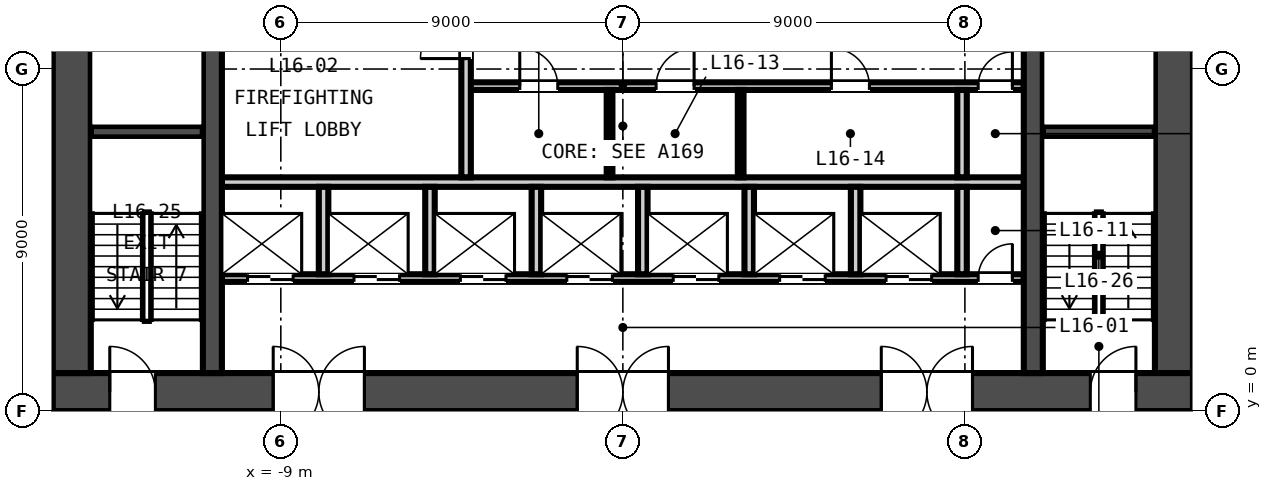
"""IFC4 building model, lengths in metres.
Left out: names, types, materials, properties, quantities, classifications, styles, units other than length and angle.
Written with IfcOpenShell. Run it as: python <this file> out.ifc"""

import sys

from ifc_helpers import new_model, si_unit, direction, frame, frame_2d, origin, place, context, subcontext, project, spatial, rectangle, extrude, element, fill, save


model = new_model("IFC4")
c1 = context("Model", 3, precision=1e-05, world=origin(), true_north=direction((0.0, 1.0)))
c2 = subcontext(c1, "Body", "Model", "MODEL_VIEW")
j1 = project(units=[si_unit("LENGTHUNIT", "METRE"), si_unit("PLANEANGLEUNIT", "RADIAN")], contexts=[c1])
p1 = place(None, origin())
s1 = spatial("IfcSite", under=j1, at=p1, CompositionType="ELEMENT")
p2 = place(p1, origin())
s2 = spatial("IfcBuilding", under=s1, at=p2, CompositionType="ELEMENT")
p3 = place(p2, frame((0.0, 0.0, 72.5)))
s3 = spatial("IfcBuildingStorey", under=s2, at=p3, CompositionType="ELEMENT", Elevation=72.5)
p4 = place(p3, frame((-15.0, 0.5, -0.15), z_axis=(0.0, 0.0, 1.0), x_axis=(1.0, 0.0, 0.0)))
e1 = element("IfcWall", 1, at=p4, inside=s3, PredefinedType="SOLIDWALL", context=c2, shape_type="SweptSolid", body=[
    extrude(rectangle(XDim=30.0, YDim=1.0, at=frame_2d((15.0, 0.0))), origin(), (0.0, 0.0, 1.0), 3.5),
])
p5 = place(p4, frame((5.8, 0.0, 0.15)))
e2 = element("IfcOpeningElement", 2, at=p5, cuts=e1, PredefinedType="OPENING", context=c2, shape_type="SweptSolid", body=[
    extrude(rectangle(XDim=2.4, YDim=2.4, at=frame_2d((1.2, 1.2))), frame((0.0, 0.51, 0.0), z_axis=(0.0, -1.0, 0.0), x_axis=(1.0, 0.0, 0.0)), (0.0, 0.0, 1.0), 1.02),
])
p6 = place(p4, frame((13.8, 0.0, 0.15)))
e3 = element("IfcOpeningElement", 3, at=p6, cuts=e1, PredefinedType="OPENING", context=c2, shape_type="SweptSolid", body=[
    extrude(rectangle(XDim=2.4, YDim=2.4, at=frame_2d((1.2, 1.2))), frame((0.0, 0.51, 0.0), z_axis=(0.0, -1.0, 0.0), x_axis=(1.0, 0.0, 0.0)), (0.0, 0.0, 1.0), 1.02),
])
p7 = place(p4, frame((21.8, 0.0, 0.15)))
e4 = element("IfcOpeningElement", 4, at=p7, cuts=e1, PredefinedType="OPENING", context=c2, shape_type="SweptSolid", body=[
    extrude(rectangle(XDim=2.4, YDim=2.4, at=frame_2d((1.2, 1.2))), frame((0.0, 0.51, 0.0), z_axis=(0.0, -1.0, 0.0), x_axis=(1.0, 0.0, 0.0)), (0.0, 0.0, 1.0), 1.02),
])
p8 = place(p4, frame((1.5, 0.0, 0.15)))
e5 = element("IfcOpeningElement", 5, at=p8, cuts=e1, PredefinedType="OPENING", context=c2, shape_type="SweptSolid", body=[
    extrude(rectangle(XDim=1.2, YDim=2.1, at=frame_2d((0.6, 1.05))), frame((0.0, 0.51, 0.0), z_axis=(0.0, -1.0, 0.0), x_axis=(1.0, 0.0, 0.0)), (0.0, 0.0, 1.0), 1.02),
])
p9 = place(p4, frame((27.3, 0.0, 0.15)))
e6 = element("IfcOpeningElement", 6, at=p9, cuts=e1, PredefinedType="OPENING", context=c2, shape_type="SweptSolid", body=[
    extrude(rectangle(XDim=1.2, YDim=2.1, at=frame_2d((0.6, 1.05))), frame((0.0, 0.51, 0.0), z_axis=(0.0, -1.0, 0.0), x_axis=(1.0, 0.0, 0.0)), (0.0, 0.0, 1.0), 1.02),
])
for number, where, z_axis, x_axis in (
    (7, (-14.5, 1.0, -0.15), (0.0, 0.0, 1.0), (0.0, 1.0, 0.0)),
    (8, (14.5, 1.0, -0.15), (0.0, 0.0, 1.0), (0.0, 1.0, 0.0)),
):
    element("IfcWall", number, at=place(p3, frame(where, z_axis=z_axis, x_axis=x_axis)), inside=s3, PredefinedType="SOLIDWALL", context=c2, shape_type="SweptSolid", body=[
        extrude(rectangle(XDim=13.0, YDim=1.0, at=frame_2d((6.5, 0.0))), origin(), (0.0, 0.0, 1.0), 3.5),
    ])
for number, where, z_axis, x_axis in (
    (9, (-10.8, 1.0, -0.15), (0.0, 0.0, 1.0), (0.0, 1.0, 0.0)),
    (10, (10.8, 1.0, -0.15), (0.0, 0.0, 1.0), (0.0, 1.0, 0.0)),
):
    element("IfcWall", number, at=place(p3, frame(where, z_axis=z_axis, x_axis=x_axis)), inside=s3, PredefinedType="SOLIDWALL", context=c2, shape_type="SweptSolid", body=[
        extrude(rectangle(XDim=13.0, YDim=0.5, at=frame_2d((6.5, 0.0))), origin(), (0.0, 0.0, 1.0), 3.5),
    ])
p10 = place(p3, frame((-10.55, 3.5, 0.0), z_axis=(0.0, 0.0, 1.0), x_axis=(1.0, 0.0, 0.0)))
e11 = element("IfcWall", 11, at=p10, inside=s3, PredefinedType="PARTITIONING", context=c2, shape_type="SweptSolid", body=[
    extrude(rectangle(XDim=21.1, YDim=0.2, at=frame_2d((10.55, 0.0))), origin(), (0.0, 0.0, 1.0), 3.35),
])
p11 = place(p10, frame((0.675, 0.0, 0.0)))
e12 = element("IfcOpeningElement", 12, at=p11, cuts=e11, PredefinedType="OPENING", context=c2, shape_type="SweptSolid", body=[
    extrude(rectangle(XDim=1.2, YDim=2.1, at=frame_2d((0.6, 1.05))), frame((0.0, 0.11, 0.0), z_axis=(0.0, -1.0, 0.0), x_axis=(1.0, 0.0, 0.0)), (0.0, 0.0, 1.0), 0.22),
])
p12 = place(p10, frame((3.475, 0.0, 0.0)))
e13 = element("IfcOpeningElement", 13, at=p12, cuts=e11, PredefinedType="OPENING", context=c2, shape_type="SweptSolid", body=[
    extrude(rectangle(XDim=1.2, YDim=2.1, at=frame_2d((0.6, 1.05))), frame((0.0, 0.11, 0.0), z_axis=(0.0, -1.0, 0.0), x_axis=(1.0, 0.0, 0.0)), (0.0, 0.0, 1.0), 0.22),
])
p13 = place(p10, frame((6.275, 0.0, 0.0)))
e14 = element("IfcOpeningElement", 14, at=p13, cuts=e11, PredefinedType="OPENING", context=c2, shape_type="SweptSolid", body=[
    extrude(rectangle(XDim=1.2, YDim=2.1, at=frame_2d((0.6, 1.05))), frame((0.0, 0.11, 0.0), z_axis=(0.0, -1.0, 0.0), x_axis=(1.0, 0.0, 0.0)), (0.0, 0.0, 1.0), 0.22),
])
p14 = place(p10, frame((9.075, 0.0, 0.0)))
e15 = element("IfcOpeningElement", 15, at=p14, cuts=e11, PredefinedType="OPENING", context=c2, shape_type="SweptSolid", body=[
    extrude(rectangle(XDim=1.2, YDim=2.1, at=frame_2d((0.6, 1.05))), frame((0.0, 0.11, 0.0), z_axis=(0.0, -1.0, 0.0), x_axis=(1.0, 0.0, 0.0)), (0.0, 0.0, 1.0), 0.22),
])
p15 = place(p10, frame((11.875, 0.0, 0.0)))
e16 = element("IfcOpeningElement", 16, at=p15, cuts=e11, PredefinedType="OPENING", context=c2, shape_type="SweptSolid", body=[
    extrude(rectangle(XDim=1.2, YDim=2.1, at=frame_2d((0.6, 1.05))), frame((0.0, 0.11, 0.0), z_axis=(0.0, -1.0, 0.0), x_axis=(1.0, 0.0, 0.0)), (0.0, 0.0, 1.0), 0.22),
])
p16 = place(p10, frame((14.675, 0.0, 0.0)))
e17 = element("IfcOpeningElement", 17, at=p16, cuts=e11, PredefinedType="OPENING", context=c2, shape_type="SweptSolid", body=[
    extrude(rectangle(XDim=1.2, YDim=2.1, at=frame_2d((0.6, 1.05))), frame((0.0, 0.11, 0.0), z_axis=(0.0, -1.0, 0.0), x_axis=(1.0, 0.0, 0.0)), (0.0, 0.0, 1.0), 0.22),
])
p17 = place(p10, frame((17.475, 0.0, 0.0)))
e18 = element("IfcOpeningElement", 18, at=p17, cuts=e11, PredefinedType="OPENING", context=c2, shape_type="SweptSolid", body=[
    extrude(rectangle(XDim=1.2, YDim=2.1, at=frame_2d((0.6, 1.05))), frame((0.0, 0.11, 0.0), z_axis=(0.0, -1.0, 0.0), x_axis=(1.0, 0.0, 0.0)), (0.0, 0.0, 1.0), 0.22),
])
p18 = place(p10, frame((19.9, 0.0, 0.0)))
e19 = element("IfcOpeningElement", 19, at=p18, cuts=e11, PredefinedType="OPENING", context=c2, shape_type="SweptSolid", body=[
    extrude(rectangle(XDim=0.9, YDim=2.1, at=frame_2d((0.45, 1.05))), frame((0.0, 0.11, 0.0), z_axis=(0.0, -1.0, 0.0), x_axis=(1.0, 0.0, 0.0)), (0.0, 0.0, 1.0), 0.22),
])
p19 = place(p3, frame((-10.55, 6.025, 0.0), z_axis=(0.0, 0.0, 1.0), x_axis=(1.0, 0.0, 0.0)))
e20 = element("IfcWall", 20, at=p19, inside=s3, PredefinedType="PARTITIONING", context=c2, shape_type="SweptSolid", body=[
    extrude(rectangle(XDim=21.1, YDim=0.25, at=frame_2d((10.55, 0.0))), origin(), (0.0, 0.0, 1.0), 3.35),
])
p20 = place(p3, frame((-4.125, 8.55, 0.0), z_axis=(0.0, 0.0, 1.0), x_axis=(1.0, 0.0, 0.0)))
e21 = element("IfcWall", 21, at=p20, inside=s3, PredefinedType="PARTITIONING", context=c2, shape_type="SweptSolid", body=[
    extrude(rectangle(XDim=14.675, YDim=0.2, at=frame_2d((7.337, 0.0))), origin(), (0.0, 0.0, 1.0), 3.35),
])
p21 = place(p20, frame((1.413, 0.0, 0.0)))
e22 = element("IfcOpeningElement", 22, at=p21, cuts=e21, PredefinedType="OPENING", context=c2, shape_type="SweptSolid", body=[
    extrude(rectangle(XDim=1.0, YDim=2.1, at=frame_2d((0.5, 1.05))), frame((0.0, 0.11, 0.0), z_axis=(0.0, -1.0, 0.0), x_axis=(1.0, 0.0, 0.0)), (0.0, 0.0, 1.0), 0.22),
])
p22 = place(p20, frame((5.0, 0.0, 0.0)))
e23 = element("IfcOpeningElement", 23, at=p22, cuts=e21, PredefinedType="OPENING", context=c2, shape_type="SweptSolid", body=[
    extrude(rectangle(XDim=1.0, YDim=2.1, at=frame_2d((0.5, 1.05))), frame((0.0, 0.11, 0.0), z_axis=(0.0, -1.0, 0.0), x_axis=(1.0, 0.0, 0.0)), (0.0, 0.0, 1.0), 0.22),
])
p23 = place(p20, frame((9.613, 0.0, 0.0)))
e24 = element("IfcOpeningElement", 24, at=p23, cuts=e21, PredefinedType="OPENING", context=c2, shape_type="SweptSolid", body=[
    extrude(rectangle(XDim=1.0, YDim=2.1, at=frame_2d((0.5, 1.05))), frame((0.0, 0.11, 0.0), z_axis=(0.0, -1.0, 0.0), x_axis=(1.0, 0.0, 0.0)), (0.0, 0.0, 1.0), 0.22),
])
p24 = place(p20, frame((13.475, 0.0, 0.0)))
e25 = element("IfcOpeningElement", 25, at=p24, cuts=e21, PredefinedType="OPENING", context=c2, shape_type="SweptSolid", body=[
    extrude(rectangle(XDim=0.9, YDim=2.1, at=frame_2d((0.45, 1.05))), frame((0.0, 0.11, 0.0), z_axis=(0.0, -1.0, 0.0), x_axis=(1.0, 0.0, 0.0)), (0.0, 0.0, 1.0), 0.22),
])
p25 = place(p3, frame((-4.125, 6.15, 0.0), z_axis=(0.0, 0.0, 1.0), x_axis=(0.0, 1.0, 0.0)))
e26 = element("IfcWall", 26, at=p25, inside=s3, PredefinedType="PARTITIONING", context=c2, shape_type="SweptSolid", body=[
    extrude(rectangle(XDim=4.95, YDim=0.25, at=frame_2d((2.475, 0.0))), origin(), (0.0, 0.0, 1.0), 3.35),
])
p26 = place(p25, frame((3.125, 0.0, 0.0)))
e27 = element("IfcOpeningElement", 27, at=p26, cuts=e26, PredefinedType="OPENING", context=c2, shape_type="SweptSolid", body=[
    extrude(rectangle(XDim=1.2, YDim=2.1, at=frame_2d((0.6, 1.05))), frame((0.0, 0.135, 0.0), z_axis=(0.0, -1.0, 0.0), x_axis=(1.0, 0.0, 0.0)), (0.0, 0.0, 1.0), 0.27),
])
for number, where, z_axis, x_axis in (
    (28, (-7.875, 3.6, 0.0), (0.0, 0.0, 1.0), (0.0, 1.0, 0.0)),
    (29, (-5.075, 3.6, 0.0), (0.0, 0.0, 1.0), (0.0, 1.0, 0.0)),
    (30, (-2.275, 3.6, 0.0), (0.0, 0.0, 1.0), (0.0, 1.0, 0.0)),
    (31, (0.525, 3.6, 0.0), (0.0, 0.0, 1.0), (0.0, 1.0, 0.0)),
    (32, (3.325, 3.6, 0.0), (0.0, 0.0, 1.0), (0.0, 1.0, 0.0)),
    (33, (6.125, 3.6, 0.0), (0.0, 0.0, 1.0), (0.0, 1.0, 0.0)),
    (34, (8.925, 3.6, 0.0), (0.0, 0.0, 1.0), (0.0, 1.0, 0.0)),
):
    element("IfcWall", number, at=place(p3, frame(where, z_axis=z_axis, x_axis=x_axis)), inside=s3, PredefinedType="PARTITIONING", context=c2, shape_type="SweptSolid", body=[
        extrude(rectangle(XDim=2.3, YDim=0.25, at=frame_2d((1.15, 0.0))), origin(), (0.0, 0.0, 1.0), 3.35),
    ])
for number, where, z_axis, x_axis in (
    (35, (-0.35, 6.15, 0.0), (0.0, 0.0, 1.0), (0.0, 1.0, 0.0)),
    (36, (3.1, 6.15, 0.0), (0.0, 0.0, 1.0), (0.0, 1.0, 0.0)),
):
    element("IfcWall", number, at=place(p3, frame(where, z_axis=z_axis, x_axis=x_axis)), inside=s3, PredefinedType="PARTITIONING", context=c2, shape_type="SweptSolid", body=[
        extrude(rectangle(XDim=2.3, YDim=0.15, at=frame_2d((1.15, 0.0))), origin(), (0.0, 0.0, 1.0), 3.35),
    ])
p27 = place(p3, frame((8.925, 6.15, 0.0), z_axis=(0.0, 0.0, 1.0), x_axis=(0.0, 1.0, 0.0)))
e37 = element("IfcWall", 37, at=p27, inside=s3, PredefinedType="PARTITIONING", context=c2, shape_type="SweptSolid", body=[
    extrude(rectangle(XDim=2.3, YDim=0.25, at=frame_2d((1.15, 0.0))), origin(), (0.0, 0.0, 1.0), 3.35),
])
for number, where, z_axis, x_axis in (
    (38, (-14.0, 7.35, -0.15), (0.0, 0.0, 1.0), (1.0, 0.0, 0.0)),
    (39, (11.05, 7.35, -0.15), (0.0, 0.0, 1.0), (1.0, 0.0, 0.0)),
):
    element("IfcWall", number, at=place(p3, frame(where, z_axis=z_axis, x_axis=x_axis)), inside=s3, PredefinedType="SOLIDWALL", context=c2, shape_type="SweptSolid", body=[
        extrude(rectangle(XDim=2.95, YDim=0.3, at=frame_2d((1.475, 0.0))), origin(), (0.0, 0.0, 1.0), 3.5),
    ])
p28 = place(p26, origin())
e40 = element("IfcDoor", 40, at=p28, inside=s3, OperationType="SINGLE_SWING_LEFT", PredefinedType="DOOR", context=c2, shape_type="SweptSolid", body=[
    extrude(rectangle(XDim=1.2, YDim=2.1, at=frame_2d((0.6, 1.05))), frame((0.0, 0.025, 0.0), z_axis=(0.0, -1.0, 0.0), x_axis=(1.0, 0.0, 0.0)), (0.0, 0.0, 1.0), 0.05),
])
fill(e27, e40)
p29 = place(p11, origin())
e41 = element("IfcDoor", 41, at=p29, inside=s3, OperationType="DOUBLE_DOOR_SLIDING", PredefinedType="DOOR", context=c2, shape_type="SweptSolid", body=[
    extrude(rectangle(XDim=1.2, YDim=2.1, at=frame_2d((0.6, 1.05))), frame((0.0, 0.025, 0.0), z_axis=(0.0, -1.0, 0.0), x_axis=(1.0, 0.0, 0.0)), (0.0, 0.0, 1.0), 0.05),
])
fill(e12, e41)
p30 = place(p12, origin())
e42 = element("IfcDoor", 42, at=p30, inside=s3, OperationType="DOUBLE_DOOR_SLIDING", PredefinedType="DOOR", context=c2, shape_type="SweptSolid", body=[
    extrude(rectangle(XDim=1.2, YDim=2.1, at=frame_2d((0.6, 1.05))), frame((0.0, 0.025, 0.0), z_axis=(0.0, -1.0, 0.0), x_axis=(1.0, 0.0, 0.0)), (0.0, 0.0, 1.0), 0.05),
])
fill(e13, e42)
p31 = place(p13, origin())
e43 = element("IfcDoor", 43, at=p31, inside=s3, OperationType="DOUBLE_DOOR_SLIDING", PredefinedType="DOOR", context=c2, shape_type="SweptSolid", body=[
    extrude(rectangle(XDim=1.2, YDim=2.1, at=frame_2d((0.6, 1.05))), frame((0.0, 0.025, 0.0), z_axis=(0.0, -1.0, 0.0), x_axis=(1.0, 0.0, 0.0)), (0.0, 0.0, 1.0), 0.05),
])
fill(e14, e43)
p32 = place(p14, origin())
e44 = element("IfcDoor", 44, at=p32, inside=s3, OperationType="DOUBLE_DOOR_SLIDING", PredefinedType="DOOR", context=c2, shape_type="SweptSolid", body=[
    extrude(rectangle(XDim=1.2, YDim=2.1, at=frame_2d((0.6, 1.05))), frame((0.0, 0.025, 0.0), z_axis=(0.0, -1.0, 0.0), x_axis=(1.0, 0.0, 0.0)), (0.0, 0.0, 1.0), 0.05),
])
fill(e15, e44)
p33 = place(p15, origin())
e45 = element("IfcDoor", 45, at=p33, inside=s3, OperationType="DOUBLE_DOOR_SLIDING", PredefinedType="DOOR", context=c2, shape_type="SweptSolid", body=[
    extrude(rectangle(XDim=1.2, YDim=2.1, at=frame_2d((0.6, 1.05))), frame((0.0, 0.025, 0.0), z_axis=(0.0, -1.0, 0.0), x_axis=(1.0, 0.0, 0.0)), (0.0, 0.0, 1.0), 0.05),
])
fill(e16, e45)
p34 = place(p16, origin())
e46 = element("IfcDoor", 46, at=p34, inside=s3, OperationType="DOUBLE_DOOR_SLIDING", PredefinedType="DOOR", context=c2, shape_type="SweptSolid", body=[
    extrude(rectangle(XDim=1.2, YDim=2.1, at=frame_2d((0.6, 1.05))), frame((0.0, 0.025, 0.0), z_axis=(0.0, -1.0, 0.0), x_axis=(1.0, 0.0, 0.0)), (0.0, 0.0, 1.0), 0.05),
])
fill(e17, e46)
p35 = place(p17, origin())
e47 = element("IfcDoor", 47, at=p35, inside=s3, OperationType="DOUBLE_DOOR_SLIDING", PredefinedType="DOOR", context=c2, shape_type="SweptSolid", body=[
    extrude(rectangle(XDim=1.2, YDim=2.1, at=frame_2d((0.6, 1.05))), frame((0.0, 0.025, 0.0), z_axis=(0.0, -1.0, 0.0), x_axis=(1.0, 0.0, 0.0)), (0.0, 0.0, 1.0), 0.05),
])
fill(e18, e47)
p36 = place(p18, origin())
e48 = element("IfcDoor", 48, at=p36, inside=s3, OperationType="SINGLE_SWING_RIGHT", PredefinedType="DOOR", context=c2, shape_type="SweptSolid", body=[
    extrude(rectangle(XDim=0.9, YDim=2.1, at=frame_2d((0.45, 1.05))), frame((0.0, 0.025, 0.0), z_axis=(0.0, -1.0, 0.0), x_axis=(1.0, 0.0, 0.0)), (0.0, 0.0, 1.0), 0.05),
])
fill(e19, e48)
p37 = place(p21, origin())
e49 = element("IfcDoor", 49, at=p37, inside=s3, OperationType="SINGLE_SWING_LEFT", PredefinedType="DOOR", context=c2, shape_type="SweptSolid", body=[
    extrude(rectangle(XDim=1.0, YDim=2.1, at=frame_2d((0.5, 1.05))), frame((0.0, 0.025, 0.0), z_axis=(0.0, -1.0, 0.0), x_axis=(1.0, 0.0, 0.0)), (0.0, 0.0, 1.0), 0.05),
])
fill(e22, e49)
p38 = place(p22, origin())
e50 = element("IfcDoor", 50, at=p38, inside=s3, OperationType="SINGLE_SWING_RIGHT", PredefinedType="DOOR", context=c2, shape_type="SweptSolid", body=[
    extrude(rectangle(XDim=1.0, YDim=2.1, at=frame_2d((0.5, 1.05))), frame((0.0, 0.025, 0.0), z_axis=(0.0, -1.0, 0.0), x_axis=(1.0, 0.0, 0.0)), (0.0, 0.0, 1.0), 0.05),
])
fill(e23, e50)
p39 = place(p23, origin())
e51 = element("IfcDoor", 51, at=p39, inside=s3, OperationType="SINGLE_SWING_LEFT", PredefinedType="DOOR", context=c2, shape_type="SweptSolid", body=[
    extrude(rectangle(XDim=1.0, YDim=2.1, at=frame_2d((0.5, 1.05))), frame((0.0, 0.025, 0.0), z_axis=(0.0, -1.0, 0.0), x_axis=(1.0, 0.0, 0.0)), (0.0, 0.0, 1.0), 0.05),
])
fill(e24, e51)
p40 = place(p24, origin())
e52 = element("IfcDoor", 52, at=p40, inside=s3, OperationType="SINGLE_SWING_RIGHT", PredefinedType="DOOR", context=c2, shape_type="SweptSolid", body=[
    extrude(rectangle(XDim=0.9, YDim=2.1, at=frame_2d((0.45, 1.05))), frame((0.0, 0.025, 0.0), z_axis=(0.0, -1.0, 0.0), x_axis=(1.0, 0.0, 0.0)), (0.0, 0.0, 1.0), 0.05),
])
fill(e25, e52)
p41 = place(p5, origin())
e53 = element("IfcDoor", 53, at=p41, inside=s3, OperationType="DOUBLE_DOOR_DOUBLE_SWING", PredefinedType="DOOR", context=c2, shape_type="SweptSolid", body=[
    extrude(rectangle(XDim=2.4, YDim=2.4, at=frame_2d((1.2, 1.2))), frame((0.0, 0.025, 0.0), z_axis=(0.0, -1.0, 0.0), x_axis=(1.0, 0.0, 0.0)), (0.0, 0.0, 1.0), 0.05),
])
fill(e2, e53)
p42 = place(p6, origin())
e54 = element("IfcDoor", 54, at=p42, inside=s3, OperationType="DOUBLE_DOOR_DOUBLE_SWING", PredefinedType="DOOR", context=c2, shape_type="SweptSolid", body=[
    extrude(rectangle(XDim=2.4, YDim=2.4, at=frame_2d((1.2, 1.2))), frame((0.0, 0.025, 0.0), z_axis=(0.0, -1.0, 0.0), x_axis=(1.0, 0.0, 0.0)), (0.0, 0.0, 1.0), 0.05),
])
fill(e3, e54)
p43 = place(p7, origin())
e55 = element("IfcDoor", 55, at=p43, inside=s3, OperationType="DOUBLE_DOOR_DOUBLE_SWING", PredefinedType="DOOR", context=c2, shape_type="SweptSolid", body=[
    extrude(rectangle(XDim=2.4, YDim=2.4, at=frame_2d((1.2, 1.2))), frame((0.0, 0.025, 0.0), z_axis=(0.0, -1.0, 0.0), x_axis=(1.0, 0.0, 0.0)), (0.0, 0.0, 1.0), 0.05),
])
fill(e4, e55)
p44 = place(p8, origin())
e56 = element("IfcDoor", 56, at=p44, inside=s3, OperationType="SINGLE_SWING_LEFT", PredefinedType="DOOR", context=c2, shape_type="SweptSolid", body=[
    extrude(rectangle(XDim=1.2, YDim=2.1, at=frame_2d((0.6, 1.05))), frame((0.0, 0.025, 0.0), z_axis=(0.0, -1.0, 0.0), x_axis=(1.0, 0.0, 0.0)), (0.0, 0.0, 1.0), 0.05),
])
fill(e5, e56)
p45 = place(p9, origin())
e57 = element("IfcDoor", 57, at=p45, inside=s3, OperationType="SINGLE_SWING_RIGHT", PredefinedType="DOOR", context=c2, shape_type="SweptSolid", body=[
    extrude(rectangle(XDim=1.2, YDim=2.1, at=frame_2d((0.6, 1.05))), frame((0.0, 0.025, 0.0), z_axis=(0.0, -1.0, 0.0), x_axis=(1.0, 0.0, 0.0)), (0.0, 0.0, 1.0), 0.05),
])
fill(e6, e57)
save(model, sys.argv[1])
